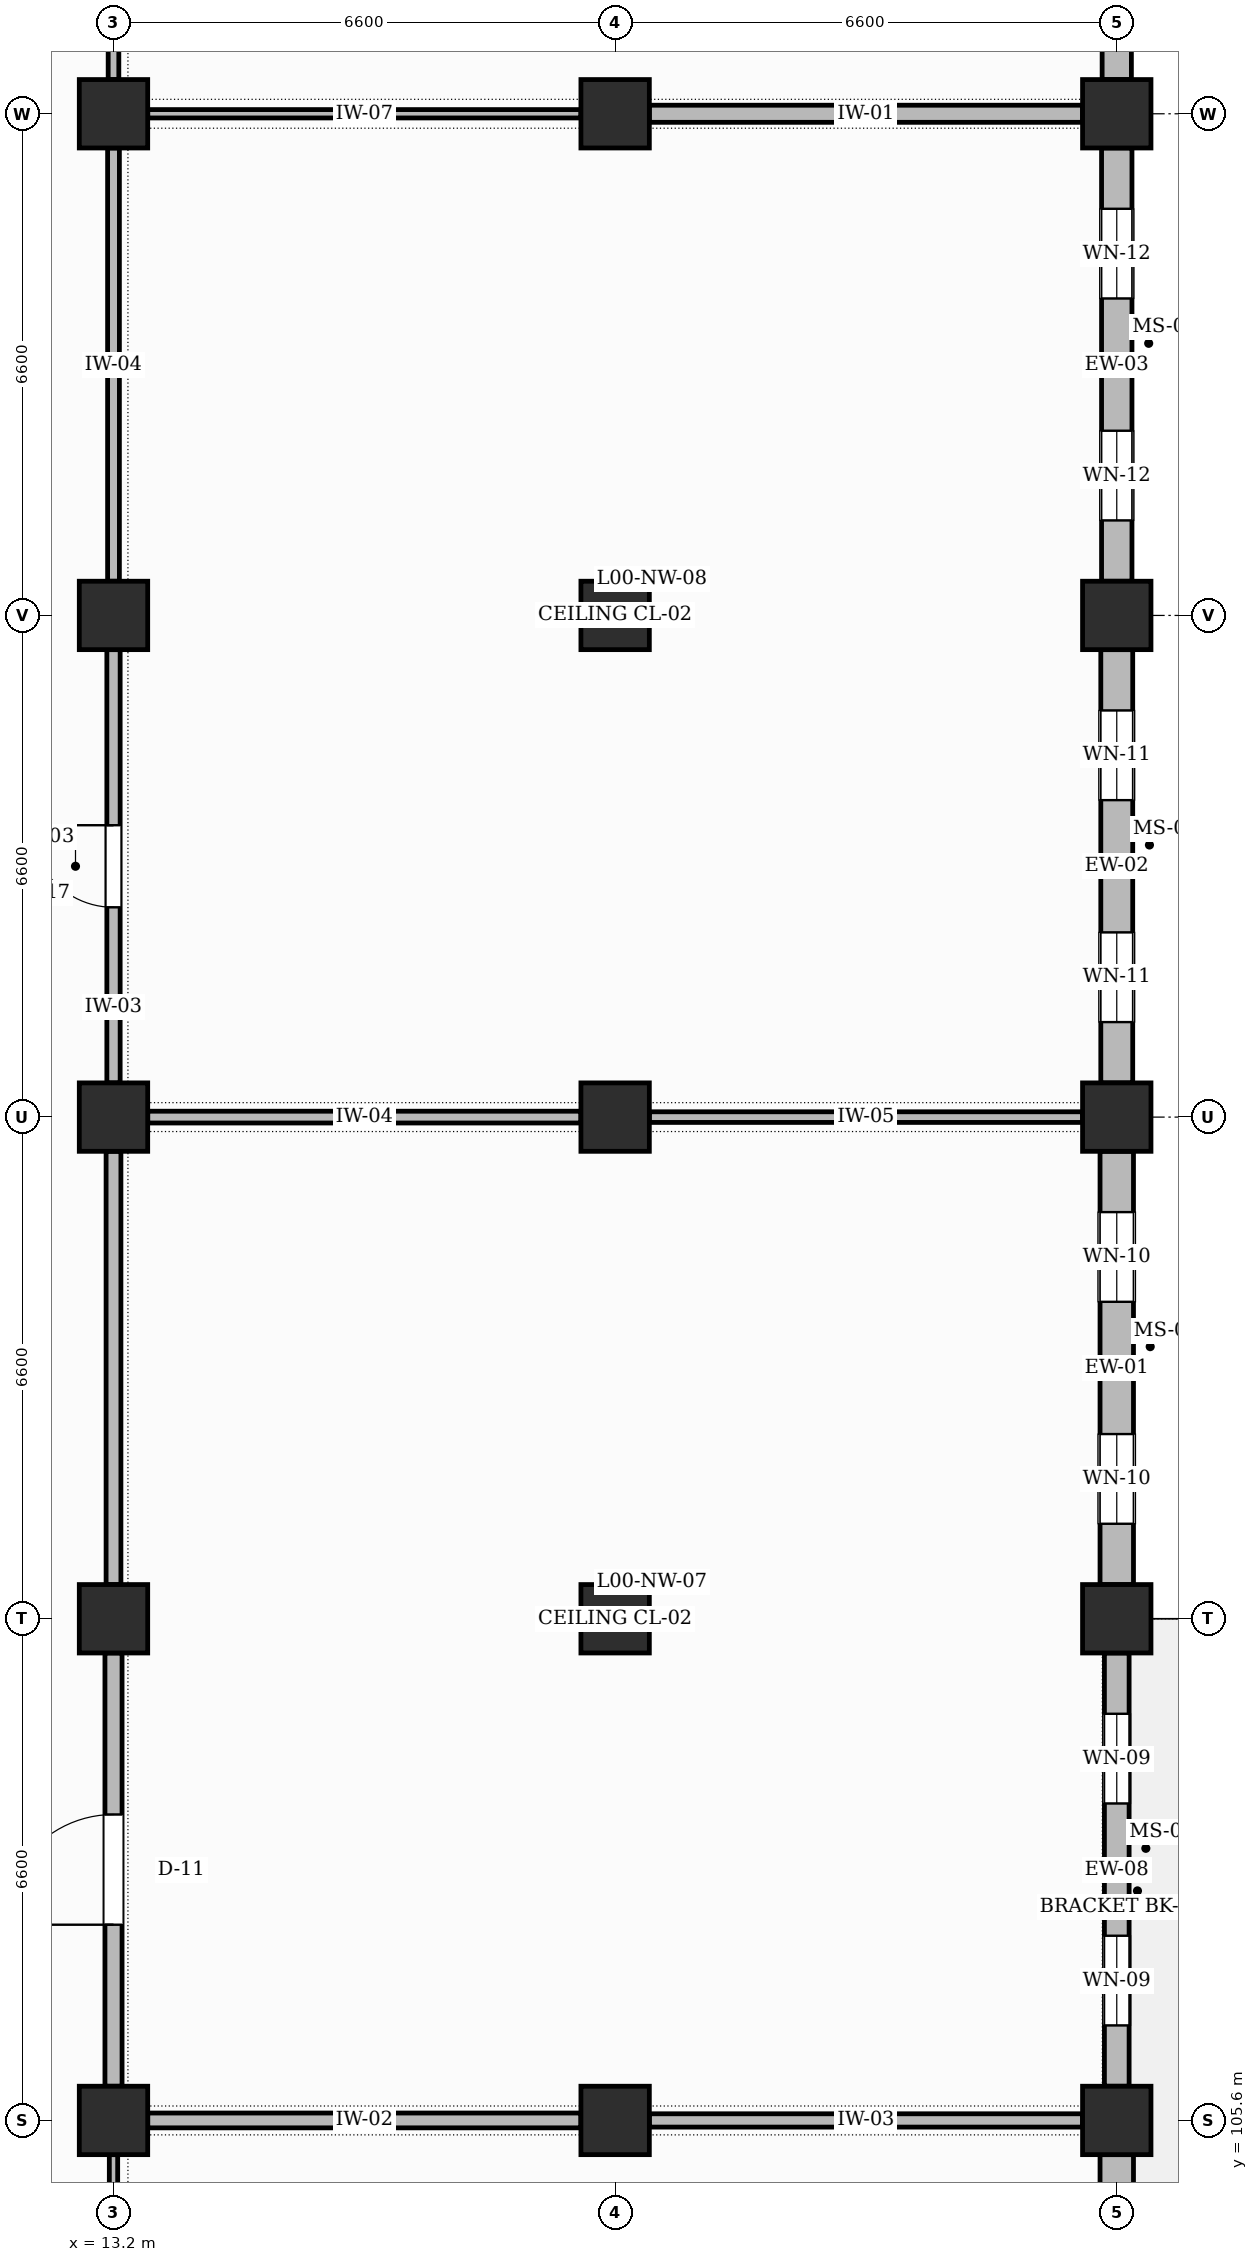
"""IFC4 building model, lengths in metres.
Left out: names, types, materials, properties, quantities, classifications, styles, units other than length and angle.
Written with IfcOpenShell. Run it as: python <this file> out.ifc"""

import sys

from ifc_helpers import new_model, si_unit, direction, frame, frame_2d, origin, origin_2d, place, context, subcontext, project, spatial, rectangle, extrude, element, fill, save


model = new_model("IFC4")
c1 = context("Model", 3, precision=1e-05, world=origin(), true_north=direction((0.0, 1.0)))
c2 = subcontext(c1, "Body", "Model", "MODEL_VIEW")
j1 = project(units=[si_unit("LENGTHUNIT", "METRE"), si_unit("PLANEANGLEUNIT", "RADIAN")], contexts=[c1])
p1 = place(None, origin())
s1 = spatial("IfcSite", under=j1, at=p1, CompositionType="ELEMENT")
p2 = place(p1, origin())
s2 = spatial("IfcBuilding", under=s1, at=p2, CompositionType="ELEMENT")
p3 = place(p2, origin())
s3 = spatial("IfcBuildingStorey", under=s2, at=p3, CompositionType="ELEMENT", Elevation=0.0)
for number, where, z_axis, x_axis in (
    (1, (13.2, 105.6, 0.0), (0.0, 0.0, 1.0), (1.0, 0.0, 0.0)),
    (2, (13.2, 112.2, 0.0), (0.0, 0.0, 1.0), (1.0, 0.0, 0.0)),
    (3, (13.2, 118.8, 0.0), (0.0, 0.0, 1.0), (1.0, 0.0, 0.0)),
    (4, (13.2, 125.4, 0.0), (0.0, 0.0, 1.0), (1.0, 0.0, 0.0)),
    (5, (13.2, 132.0, 0.0), (0.0, 0.0, 1.0), (1.0, 0.0, 0.0)),
    (6, (19.8, 105.6, 0.0), (0.0, 0.0, 1.0), (1.0, 0.0, 0.0)),
    (7, (19.8, 112.2, 0.0), (0.0, 0.0, 1.0), (1.0, 0.0, 0.0)),
    (8, (19.8, 118.8, 0.0), (0.0, 0.0, 1.0), (1.0, 0.0, 0.0)),
    (9, (19.8, 125.4, 0.0), (0.0, 0.0, 1.0), (1.0, 0.0, 0.0)),
    (10, (19.8, 132.0, 0.0), (0.0, 0.0, 1.0), (1.0, 0.0, 0.0)),
    (11, (26.4, 105.6, 0.0), (0.0, 0.0, 1.0), (1.0, 0.0, 0.0)),
    (12, (26.4, 112.2, 0.0), (0.0, 0.0, 1.0), (1.0, 0.0, 0.0)),
    (13, (26.4, 118.8, 0.0), (0.0, 0.0, 1.0), (1.0, 0.0, 0.0)),
    (14, (26.4, 125.4, 0.0), (0.0, 0.0, 1.0), (1.0, 0.0, 0.0)),
    (15, (26.4, 132.0, 0.0), (0.0, 0.0, 1.0), (1.0, 0.0, 0.0)),
):
    element("IfcColumn", number, at=place(p3, frame(where, z_axis=z_axis, x_axis=x_axis)), inside=s3, PredefinedType="COLUMN", context=c2, shape_type="SweptSolid", body=[
        extrude(rectangle(XDim=0.9, YDim=0.9, at=origin_2d()), origin(), (0.0, 0.0, 1.0), 5.4),
    ])
p4 = place(p3, frame((26.4, 99.45, 0.0), z_axis=(0.0, 0.0, 1.0), x_axis=(0.0, 1.0, 0.0)))
e16 = element("IfcWall", 16, at=p4, inside=s3, PredefinedType="SOLIDWALL", context=c2, shape_type="SweptSolid", body=[
    extrude(rectangle(XDim=5.7, YDim=0.44, at=frame_2d((2.85, 0.0))), origin(), (0.0, 0.0, 1.0), 4.45),
])
p5 = place(p4, frame((1.875, 0.0, 0.0)))
e17 = element("IfcOpeningElement", 17, at=p5, cuts=e16, PredefinedType="OPENING", context=c2, shape_type="SweptSolid", body=[
    extrude(rectangle(XDim=1.95, YDim=2.45, at=frame_2d((0.975, 1.225))), frame((0.0, 0.23, 0.0), z_axis=(0.0, -1.0, 0.0), x_axis=(1.0, 0.0, 0.0)), (0.0, 0.0, 1.0), 0.46),
])
p6 = place(p3, frame((26.4, 106.05, 0.0), z_axis=(0.0, 0.0, 1.0), x_axis=(0.0, 1.0, 0.0)))
e18 = element("IfcWall", 18, at=p6, inside=s3, PredefinedType="SOLIDWALL", context=c2, shape_type="SweptSolid", body=[
    extrude(rectangle(XDim=5.7, YDim=0.325, at=frame_2d((2.85, 0.0))), origin(), (0.0, 0.0, 1.0), 4.45),
])
p7 = place(p6, frame((0.8, 0.0, 0.95)))
e19 = element("IfcOpeningElement", 19, at=p7, cuts=e18, PredefinedType="OPENING", context=c2, shape_type="SweptSolid", body=[
    extrude(rectangle(XDim=1.18, YDim=1.3, at=frame_2d((0.59, 0.65))), frame((0.0, 0.172, 0.0), z_axis=(0.0, -1.0, 0.0), x_axis=(1.0, 0.0, 0.0)), (0.0, 0.0, 1.0), 0.345),
])
p8 = place(p6, frame((3.72, 0.0, 0.95)))
e20 = element("IfcOpeningElement", 20, at=p8, cuts=e18, PredefinedType="OPENING", context=c2, shape_type="SweptSolid", body=[
    extrude(rectangle(XDim=1.18, YDim=1.3, at=frame_2d((0.59, 0.65))), frame((0.0, 0.172, 0.0), z_axis=(0.0, -1.0, 0.0), x_axis=(1.0, 0.0, 0.0)), (0.0, 0.0, 1.0), 0.345),
])
p9 = place(p3, frame((26.4, 112.65, 0.0), z_axis=(0.0, 0.0, 1.0), x_axis=(0.0, 1.0, 0.0)))
e21 = element("IfcWall", 21, at=p9, inside=s3, PredefinedType="SOLIDWALL", context=c2, shape_type="SweptSolid", body=[
    extrude(rectangle(XDim=5.7, YDim=0.44, at=frame_2d((2.85, 0.0))), origin(), (0.0, 0.0, 1.0), 4.45),
])
p10 = place(p9, frame((0.8, 0.0, 0.95)))
e22 = element("IfcOpeningElement", 22, at=p10, cuts=e21, PredefinedType="OPENING", context=c2, shape_type="SweptSolid", body=[
    extrude(rectangle(XDim=1.18, YDim=1.52, at=frame_2d((0.59, 0.76))), frame((0.0, 0.23, 0.0), z_axis=(0.0, -1.0, 0.0), x_axis=(1.0, 0.0, 0.0)), (0.0, 0.0, 1.0), 0.46),
])
p11 = place(p9, frame((3.72, 0.0, 0.95)))
e23 = element("IfcOpeningElement", 23, at=p11, cuts=e21, PredefinedType="OPENING", context=c2, shape_type="SweptSolid", body=[
    extrude(rectangle(XDim=1.18, YDim=1.52, at=frame_2d((0.59, 0.76))), frame((0.0, 0.23, 0.0), z_axis=(0.0, -1.0, 0.0), x_axis=(1.0, 0.0, 0.0)), (0.0, 0.0, 1.0), 0.46),
])
p12 = place(p3, frame((26.4, 119.25, 0.0), z_axis=(0.0, 0.0, 1.0), x_axis=(0.0, 1.0, 0.0)))
e24 = element("IfcWall", 24, at=p12, inside=s3, PredefinedType="SOLIDWALL", context=c2, shape_type="SweptSolid", body=[
    extrude(rectangle(XDim=5.7, YDim=0.42, at=frame_2d((2.85, 0.0))), origin(), (0.0, 0.0, 1.0), 4.45),
])
p13 = place(p12, frame((0.8, 0.0, 0.95)))
e25 = element("IfcOpeningElement", 25, at=p13, cuts=e24, PredefinedType="OPENING", context=c2, shape_type="SweptSolid", body=[
    extrude(rectangle(XDim=1.18, YDim=1.74, at=frame_2d((0.59, 0.87))), frame((0.0, 0.22, 0.0), z_axis=(0.0, -1.0, 0.0), x_axis=(1.0, 0.0, 0.0)), (0.0, 0.0, 1.0), 0.44),
])
p14 = place(p12, frame((3.72, 0.0, 0.95)))
e26 = element("IfcOpeningElement", 26, at=p14, cuts=e24, PredefinedType="OPENING", context=c2, shape_type="SweptSolid", body=[
    extrude(rectangle(XDim=1.18, YDim=1.74, at=frame_2d((0.59, 0.87))), frame((0.0, 0.22, 0.0), z_axis=(0.0, -1.0, 0.0), x_axis=(1.0, 0.0, 0.0)), (0.0, 0.0, 1.0), 0.44),
])
p15 = place(p3, frame((26.4, 125.85, 0.0), z_axis=(0.0, 0.0, 1.0), x_axis=(0.0, 1.0, 0.0)))
e27 = element("IfcWall", 27, at=p15, inside=s3, PredefinedType="SOLIDWALL", context=c2, shape_type="SweptSolid", body=[
    extrude(rectangle(XDim=5.7, YDim=0.4, at=frame_2d((2.85, 0.0))), origin(), (0.0, 0.0, 1.0), 4.45),
])
p16 = place(p15, frame((0.8, 0.0, 0.95)))
e28 = element("IfcOpeningElement", 28, at=p16, cuts=e27, PredefinedType="OPENING", context=c2, shape_type="SweptSolid", body=[
    extrude(rectangle(XDim=1.18, YDim=1.96, at=frame_2d((0.59, 0.98))), frame((0.0, 0.21, 0.0), z_axis=(0.0, -1.0, 0.0), x_axis=(1.0, 0.0, 0.0)), (0.0, 0.0, 1.0), 0.42),
])
p17 = place(p15, frame((3.72, 0.0, 0.95)))
e29 = element("IfcOpeningElement", 29, at=p17, cuts=e27, PredefinedType="OPENING", context=c2, shape_type="SweptSolid", body=[
    extrude(rectangle(XDim=1.18, YDim=1.96, at=frame_2d((0.59, 0.98))), frame((0.0, 0.21, 0.0), z_axis=(0.0, -1.0, 0.0), x_axis=(1.0, 0.0, 0.0)), (0.0, 0.0, 1.0), 0.42),
])
p18 = place(p3, frame((26.4, 132.45, 0.0), z_axis=(0.0, 0.0, 1.0), x_axis=(0.0, 1.0, 0.0)))
e30 = element("IfcWall", 30, at=p18, inside=s3, PredefinedType="SOLIDWALL", context=c2, shape_type="SweptSolid", body=[
    extrude(rectangle(XDim=5.7, YDim=0.385, at=frame_2d((2.85, 0.0))), origin(), (0.0, 0.0, 1.0), 4.45),
])
p19 = place(p18, frame((0.8, 0.0, 0.95)))
e31 = element("IfcOpeningElement", 31, at=p19, cuts=e30, PredefinedType="OPENING", context=c2, shape_type="SweptSolid", body=[
    extrude(rectangle(XDim=1.34, YDim=1.3, at=frame_2d((0.67, 0.65))), frame((0.0, 0.202, 0.0), z_axis=(0.0, -1.0, 0.0), x_axis=(1.0, 0.0, 0.0)), (0.0, 0.0, 1.0), 0.405),
])
p20 = place(p18, frame((3.56, 0.0, 0.95)))
e32 = element("IfcOpeningElement", 32, at=p20, cuts=e30, PredefinedType="OPENING", context=c2, shape_type="SweptSolid", body=[
    extrude(rectangle(XDim=1.34, YDim=1.3, at=frame_2d((0.67, 0.65))), frame((0.0, 0.202, 0.0), z_axis=(0.0, -1.0, 0.0), x_axis=(1.0, 0.0, 0.0)), (0.0, 0.0, 1.0), 0.405),
])
p21 = place(p3, frame((13.2, 99.45, 0.0), z_axis=(0.0, 0.0, 1.0), x_axis=(0.0, 1.0, 0.0)))
e33 = element("IfcWall", 33, at=p21, inside=s3, PredefinedType="PARTITIONING", context=c2, shape_type="SweptSolid", body=[
    extrude(rectangle(XDim=5.7, YDim=0.11, at=frame_2d((2.85, 0.0))), origin(), (0.0, 0.0, 1.0), 4.3),
])
p22 = place(p3, frame((13.2, 106.05, 0.0), z_axis=(0.0, 0.0, 1.0), x_axis=(0.0, 1.0, 0.0)))
e34 = element("IfcWall", 34, at=p22, inside=s3, PredefinedType="PARTITIONING", context=c2, shape_type="SweptSolid", body=[
    extrude(rectangle(XDim=5.7, YDim=0.225, at=frame_2d((2.85, 0.0))), origin(), (0.0, 0.0, 1.0), 4.3),
])
p23 = place(p22, frame((2.125, 0.0, 0.0)))
e35 = element("IfcOpeningElement", 35, at=p23, cuts=e34, PredefinedType="OPENING", context=c2, shape_type="SweptSolid", body=[
    extrude(rectangle(XDim=1.45, YDim=2.25, at=frame_2d((0.725, 1.125))), frame((0.0, 0.123, 0.0), z_axis=(0.0, -1.0, 0.0), x_axis=(1.0, 0.0, 0.0)), (0.0, 0.0, 1.0), 0.245),
])
p24 = place(p3, frame((13.2, 112.65, 0.0), z_axis=(0.0, 0.0, 1.0), x_axis=(0.0, 1.0, 0.0)))
e36 = element("IfcWall", 36, at=p24, inside=s3, PredefinedType="PARTITIONING", context=c2, shape_type="SweptSolid", body=[
    extrude(rectangle(XDim=5.7, YDim=0.195, at=frame_2d((2.85, 0.0))), origin(), (0.0, 0.0, 1.0), 4.3),
])
p25 = place(p3, frame((13.2, 119.25, 0.0), z_axis=(0.0, 0.0, 1.0), x_axis=(0.0, 1.0, 0.0)))
e37 = element("IfcWall", 37, at=p25, inside=s3, PredefinedType="PARTITIONING", context=c2, shape_type="SweptSolid", body=[
    extrude(rectangle(XDim=5.7, YDim=0.175, at=frame_2d((2.85, 0.0))), origin(), (0.0, 0.0, 1.0), 4.3),
])
p26 = place(p25, frame((2.31, 0.0, 0.0)))
e38 = element("IfcOpeningElement", 38, at=p26, cuts=e37, PredefinedType="OPENING", context=c2, shape_type="SweptSolid", body=[
    extrude(rectangle(XDim=1.08, YDim=2.15, at=frame_2d((0.54, 1.075))), frame((0.0, 0.097, 0.0), z_axis=(0.0, -1.0, 0.0), x_axis=(1.0, 0.0, 0.0)), (0.0, 0.0, 1.0), 0.195),
])
p27 = place(p3, frame((13.2, 125.85, 0.0), z_axis=(0.0, 0.0, 1.0), x_axis=(0.0, 1.0, 0.0)))
e39 = element("IfcWall", 39, at=p27, inside=s3, PredefinedType="PARTITIONING", context=c2, shape_type="SweptSolid", body=[
    extrude(rectangle(XDim=5.7, YDim=0.155, at=frame_2d((2.85, 0.0))), origin(), (0.0, 0.0, 1.0), 4.3),
])
p28 = place(p3, frame((13.2, 132.45, 0.0), z_axis=(0.0, 0.0, 1.0), x_axis=(0.0, 1.0, 0.0)))
e40 = element("IfcWall", 40, at=p28, inside=s3, PredefinedType="PARTITIONING", context=c2, shape_type="SweptSolid", body=[
    extrude(rectangle(XDim=5.7, YDim=0.14, at=frame_2d((2.85, 0.0))), origin(), (0.0, 0.0, 1.0), 4.3),
])
p29 = place(p28, frame((2.175, 0.0, 0.0)))
e41 = element("IfcOpeningElement", 41, at=p29, cuts=e40, PredefinedType="OPENING", context=c2, shape_type="SweptSolid", body=[
    extrude(rectangle(XDim=1.35, YDim=2.3, at=frame_2d((0.675, 1.15))), frame((0.0, 0.08, 0.0), z_axis=(0.0, -1.0, 0.0), x_axis=(1.0, 0.0, 0.0)), (0.0, 0.0, 1.0), 0.16),
])
p30 = place(p3, frame((13.65, 105.6, 0.0), z_axis=(0.0, 0.0, 1.0), x_axis=(1.0, 0.0, 0.0)))
e42 = element("IfcWall", 42, at=p30, inside=s3, PredefinedType="PARTITIONING", context=c2, shape_type="SweptSolid", body=[
    extrude(rectangle(XDim=5.7, YDim=0.195, at=frame_2d((2.85, 0.0))), origin(), (0.0, 0.0, 1.0), 4.2),
])
p31 = place(p3, frame((13.65, 118.8, 0.0), z_axis=(0.0, 0.0, 1.0), x_axis=(1.0, 0.0, 0.0)))
e43 = element("IfcWall", 43, at=p31, inside=s3, PredefinedType="PARTITIONING", context=c2, shape_type="SweptSolid", body=[
    extrude(rectangle(XDim=5.7, YDim=0.155, at=frame_2d((2.85, 0.0))), origin(), (0.0, 0.0, 1.0), 4.2),
])
p32 = place(p3, frame((13.65, 132.0, 0.0), z_axis=(0.0, 0.0, 1.0), x_axis=(1.0, 0.0, 0.0)))
e44 = element("IfcWall", 44, at=p32, inside=s3, PredefinedType="PARTITIONING", context=c2, shape_type="SweptSolid", body=[
    extrude(rectangle(XDim=5.7, YDim=0.11, at=frame_2d((2.85, 0.0))), origin(), (0.0, 0.0, 1.0), 4.2),
])
p33 = place(p3, frame((20.25, 105.6, 0.0), z_axis=(0.0, 0.0, 1.0), x_axis=(1.0, 0.0, 0.0)))
e45 = element("IfcWall", 45, at=p33, inside=s3, PredefinedType="PARTITIONING", context=c2, shape_type="SweptSolid", body=[
    extrude(rectangle(XDim=5.7, YDim=0.175, at=frame_2d((2.85, 0.0))), origin(), (0.0, 0.0, 1.0), 4.3),
])
p34 = place(p3, frame((20.25, 118.8, 0.0), z_axis=(0.0, 0.0, 1.0), x_axis=(1.0, 0.0, 0.0)))
e46 = element("IfcWall", 46, at=p34, inside=s3, PredefinedType="PARTITIONING", context=c2, shape_type="SweptSolid", body=[
    extrude(rectangle(XDim=5.7, YDim=0.14, at=frame_2d((2.85, 0.0))), origin(), (0.0, 0.0, 1.0), 4.3),
])
p35 = place(p3, frame((20.25, 132.0, 0.0), z_axis=(0.0, 0.0, 1.0), x_axis=(1.0, 0.0, 0.0)))
e47 = element("IfcWall", 47, at=p35, inside=s3, PredefinedType="PARTITIONING", context=c2, shape_type="SweptSolid", body=[
    extrude(rectangle(XDim=5.7, YDim=0.225, at=frame_2d((2.85, 0.0))), origin(), (0.0, 0.0, 1.0), 4.3),
])
p36 = place(p7, origin())
e48 = element("IfcWindow", 48, at=p36, inside=s3, PartitioningType="SINGLE_PANEL", PredefinedType="WINDOW", context=c2, shape_type="SweptSolid", body=[
    extrude(rectangle(XDim=1.18, YDim=1.3, at=frame_2d((0.59, 0.65))), frame((0.0, 0.03, 0.0), z_axis=(0.0, -1.0, 0.0), x_axis=(1.0, 0.0, 0.0)), (0.0, 0.0, 1.0), 0.06),
])
fill(e19, e48)
p37 = place(p8, origin())
e49 = element("IfcWindow", 49, at=p37, inside=s3, PartitioningType="SINGLE_PANEL", PredefinedType="WINDOW", context=c2, shape_type="SweptSolid", body=[
    extrude(rectangle(XDim=1.18, YDim=1.3, at=frame_2d((0.59, 0.65))), frame((0.0, 0.03, 0.0), z_axis=(0.0, -1.0, 0.0), x_axis=(1.0, 0.0, 0.0)), (0.0, 0.0, 1.0), 0.06),
])
fill(e20, e49)
p38 = place(p10, origin())
e50 = element("IfcWindow", 50, at=p38, inside=s3, PartitioningType="SINGLE_PANEL", PredefinedType="WINDOW", context=c2, shape_type="SweptSolid", body=[
    extrude(rectangle(XDim=1.18, YDim=1.52, at=frame_2d((0.59, 0.76))), frame((0.0, 0.03, 0.0), z_axis=(0.0, -1.0, 0.0), x_axis=(1.0, 0.0, 0.0)), (0.0, 0.0, 1.0), 0.06),
])
fill(e22, e50)
p39 = place(p11, origin())
e51 = element("IfcWindow", 51, at=p39, inside=s3, PartitioningType="SINGLE_PANEL", PredefinedType="WINDOW", context=c2, shape_type="SweptSolid", body=[
    extrude(rectangle(XDim=1.18, YDim=1.52, at=frame_2d((0.59, 0.76))), frame((0.0, 0.03, 0.0), z_axis=(0.0, -1.0, 0.0), x_axis=(1.0, 0.0, 0.0)), (0.0, 0.0, 1.0), 0.06),
])
fill(e23, e51)
p40 = place(p13, origin())
e52 = element("IfcWindow", 52, at=p40, inside=s3, PartitioningType="SINGLE_PANEL", PredefinedType="WINDOW", context=c2, shape_type="SweptSolid", body=[
    extrude(rectangle(XDim=1.18, YDim=1.74, at=frame_2d((0.59, 0.87))), frame((0.0, 0.03, 0.0), z_axis=(0.0, -1.0, 0.0), x_axis=(1.0, 0.0, 0.0)), (0.0, 0.0, 1.0), 0.06),
])
fill(e25, e52)
p41 = place(p14, origin())
e53 = element("IfcWindow", 53, at=p41, inside=s3, PartitioningType="SINGLE_PANEL", PredefinedType="WINDOW", context=c2, shape_type="SweptSolid", body=[
    extrude(rectangle(XDim=1.18, YDim=1.74, at=frame_2d((0.59, 0.87))), frame((0.0, 0.03, 0.0), z_axis=(0.0, -1.0, 0.0), x_axis=(1.0, 0.0, 0.0)), (0.0, 0.0, 1.0), 0.06),
])
fill(e26, e53)
p42 = place(p16, origin())
e54 = element("IfcWindow", 54, at=p42, inside=s3, PartitioningType="SINGLE_PANEL", PredefinedType="WINDOW", context=c2, shape_type="SweptSolid", body=[
    extrude(rectangle(XDim=1.18, YDim=1.96, at=frame_2d((0.59, 0.98))), frame((0.0, 0.03, 0.0), z_axis=(0.0, -1.0, 0.0), x_axis=(1.0, 0.0, 0.0)), (0.0, 0.0, 1.0), 0.06),
])
fill(e28, e54)
p43 = place(p17, origin())
e55 = element("IfcWindow", 55, at=p43, inside=s3, PartitioningType="SINGLE_PANEL", PredefinedType="WINDOW", context=c2, shape_type="SweptSolid", body=[
    extrude(rectangle(XDim=1.18, YDim=1.96, at=frame_2d((0.59, 0.98))), frame((0.0, 0.03, 0.0), z_axis=(0.0, -1.0, 0.0), x_axis=(1.0, 0.0, 0.0)), (0.0, 0.0, 1.0), 0.06),
])
fill(e29, e55)
p44 = place(p23, origin())
e56 = element("IfcDoor", 56, at=p44, inside=s3, OperationType="SINGLE_SWING_LEFT", PredefinedType="DOOR", context=c2, shape_type="SweptSolid", body=[
    extrude(rectangle(XDim=1.45, YDim=2.25, at=frame_2d((0.725, 1.125))), frame((0.0, 0.025, 0.0), z_axis=(0.0, -1.0, 0.0), x_axis=(1.0, 0.0, 0.0)), (0.0, 0.0, 1.0), 0.05),
])
fill(e35, e56)
p45 = place(p26, origin())
e57 = element("IfcDoor", 57, at=p45, inside=s3, OperationType="SINGLE_SWING_RIGHT", PredefinedType="DOOR", context=c2, shape_type="SweptSolid", body=[
    extrude(rectangle(XDim=1.08, YDim=2.15, at=frame_2d((0.54, 1.075))), frame((0.0, 0.025, 0.0), z_axis=(0.0, -1.0, 0.0), x_axis=(1.0, 0.0, 0.0)), (0.0, 0.0, 1.0), 0.05),
])
fill(e38, e57)
save(model, sys.argv[1])
